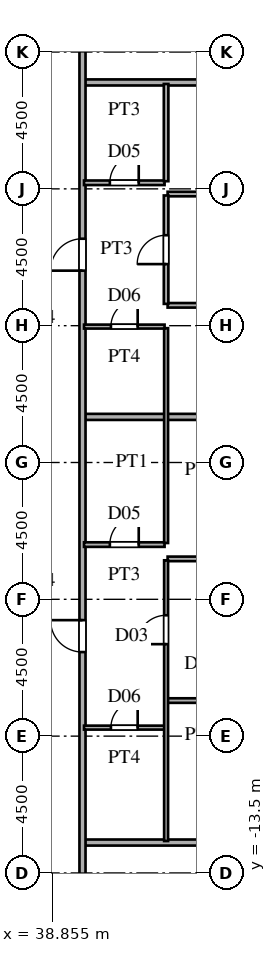
"""IFC4 building model, lengths in metres.
Left out: names, types, materials, properties, quantities, classifications, styles, units other than length and angle.
Written with IfcOpenShell. Run it as: python <this file> out.ifc"""

import sys

from ifc_helpers import new_model, si_unit, direction, frame, frame_2d, origin, place, context, subcontext, project, spatial, rectangle, extrude, source, transform, mapped, element, fill, save


model = new_model("IFC4")
c1 = context("Model", 3, precision=1e-05, world=origin(), true_north=direction((0.0, 1.0)))
c2 = subcontext(c1, "Body", "Model", "MODEL_VIEW")
j1 = project(units=[si_unit("LENGTHUNIT", "METRE"), si_unit("PLANEANGLEUNIT", "RADIAN")], contexts=[c1])
p1 = place(None, origin())
s1 = spatial("IfcSite", under=j1, at=p1, CompositionType="ELEMENT")
p2 = place(p1, origin())
s2 = spatial("IfcBuilding", under=s1, at=p2, CompositionType="ELEMENT")
p3 = place(p2, frame((0.0, 0.0, 44.1)))
s3 = spatial("IfcBuildingStorey", under=s2, at=p3, CompositionType="ELEMENT", Elevation=44.1)
p4 = place(p3, frame((39.93, -12.5, 0.0), z_axis=(0.0, 0.0, 1.0), x_axis=(1.0, 0.0, 0.0)))
e1 = element("IfcWall", 1, at=p4, inside=s3, PredefinedType="PARTITIONING", context=c2, shape_type="SweptSolid", body=[
    extrude(rectangle(XDim=26.407, YDim=0.2, at=frame_2d((13.204, 0.0))), origin(), (0.0, 0.0, 1.0), 3.38),
])
p5 = place(p3, frame((39.9, -8.72, 0.0), z_axis=(0.0, 0.0, 1.0), x_axis=(1.0, 0.0, 0.0)))
e2 = element("IfcWall", 2, at=p5, inside=s3, PredefinedType="PARTITIONING", context=c2, shape_type="SweptSolid", body=[
    extrude(rectangle(XDim=2.65, YDim=0.13, at=frame_2d((1.325, 0.0))), origin(), (0.0, 0.0, 1.0), 3.38),
])
p6 = place(p5, frame((0.885, 0.0, 0.0)))
e3 = element("IfcOpeningElement", 3, at=p6, cuts=e2, PredefinedType="OPENING", context=c2, shape_type="SweptSolid", body=[
    extrude(rectangle(XDim=0.88, YDim=2.1, at=frame_2d((0.44, 1.05))), frame((0.0, 0.075, 0.0), z_axis=(0.0, -1.0, 0.0), x_axis=(1.0, 0.0, 0.0)), (0.0, 0.0, 1.0), 0.15),
])
p7 = place(p3, frame((42.65, -7.83, 0.0), z_axis=(0.0, 0.0, 1.0), x_axis=(1.0, 0.0, 0.0)))
e4 = element("IfcWall", 4, at=p7, inside=s3, PredefinedType="PARTITIONING", context=c2, shape_type="SweptSolid", body=[
    extrude(rectangle(XDim=29.885, YDim=0.15, at=frame_2d((14.942, 0.0))), origin(), (0.0, 0.0, 1.0), 3.38),
])
p8 = place(p7, frame((5.425, 0.0, 0.0)))
e5 = element("IfcOpeningElement", 5, at=p8, cuts=e4, PredefinedType="OPENING", context=c2, shape_type="SweptSolid", body=[
    extrude(rectangle(XDim=0.95, YDim=2.15, at=frame_2d((0.475, 1.075))), frame((0.0, 0.085, 0.0), z_axis=(0.0, -1.0, 0.0), x_axis=(1.0, 0.0, 0.0)), (0.0, 0.0, 1.0), 0.17),
])
p9 = place(p7, frame((14.225, 0.0, 0.0)))
e6 = element("IfcOpeningElement", 6, at=p9, cuts=e4, PredefinedType="OPENING", context=c2, shape_type="SweptSolid", body=[
    extrude(rectangle(XDim=0.95, YDim=2.15, at=frame_2d((0.475, 1.075))), frame((0.0, 0.085, 0.0), z_axis=(0.0, -1.0, 0.0), x_axis=(1.0, 0.0, 0.0)), (0.0, 0.0, 1.0), 0.17),
])
p10 = place(p3, frame((42.65, -3.17, 0.0), z_axis=(0.0, 0.0, 1.0), x_axis=(1.0, 0.0, 0.0)))
e7 = element("IfcWall", 7, at=p10, inside=s3, PredefinedType="PARTITIONING", context=c2, shape_type="SweptSolid", body=[
    extrude(rectangle(XDim=29.885, YDim=0.15, at=frame_2d((14.942, 0.0))), origin(), (0.0, 0.0, 1.0), 3.38),
])
p11 = place(p10, frame((5.425, 0.0, 0.0)))
e8 = element("IfcOpeningElement", 8, at=p11, cuts=e7, PredefinedType="OPENING", context=c2, shape_type="SweptSolid", body=[
    extrude(rectangle(XDim=0.95, YDim=2.15, at=frame_2d((0.475, 1.075))), frame((0.0, 0.085, 0.0), z_axis=(0.0, -1.0, 0.0), x_axis=(1.0, 0.0, 0.0)), (0.0, 0.0, 1.0), 0.17),
])
p12 = place(p10, frame((14.225, 0.0, 0.0)))
e9 = element("IfcOpeningElement", 9, at=p12, cuts=e7, PredefinedType="OPENING", context=c2, shape_type="SweptSolid", body=[
    extrude(rectangle(XDim=0.95, YDim=2.15, at=frame_2d((0.475, 1.075))), frame((0.0, 0.085, 0.0), z_axis=(0.0, -1.0, 0.0), x_axis=(1.0, 0.0, 0.0)), (0.0, 0.0, 1.0), 0.17),
])
p13 = place(p3, frame((39.9, -2.7, 0.0), z_axis=(0.0, 0.0, 1.0), x_axis=(1.0, 0.0, 0.0)))
e10 = element("IfcWall", 10, at=p13, inside=s3, PredefinedType="PARTITIONING", context=c2, shape_type="SweptSolid", body=[
    extrude(rectangle(XDim=2.65, YDim=0.15, at=frame_2d((1.325, 0.0))), origin(), (0.0, 0.0, 1.0), 3.38),
])
p14 = place(p13, frame((0.85, 0.0, 0.0)))
e11 = element("IfcOpeningElement", 11, at=p14, cuts=e10, PredefinedType="OPENING", context=c2, shape_type="SweptSolid", body=[
    extrude(rectangle(XDim=0.95, YDim=2.15, at=frame_2d((0.475, 1.075))), frame((0.0, 0.085, 0.0), z_axis=(0.0, -1.0, 0.0), x_axis=(1.0, 0.0, 0.0)), (0.0, 0.0, 1.0), 0.17),
])
p15 = place(p3, frame((39.93, 1.5, 0.0), z_axis=(0.0, 0.0, 1.0), x_axis=(1.0, 0.0, 0.0)))
e12 = element("IfcWall", 12, at=p15, inside=s3, PredefinedType="PARTITIONING", context=c2, shape_type="SweptSolid", body=[
    extrude(rectangle(XDim=32.575, YDim=0.2, at=frame_2d((16.288, 0.0))), origin(), (0.0, 0.0, 1.0), 3.38),
])
p16 = place(p3, frame((39.9, 4.47, 0.0), z_axis=(0.0, 0.0, 1.0), x_axis=(1.0, 0.0, 0.0)))
e13 = element("IfcWall", 13, at=p16, inside=s3, PredefinedType="PARTITIONING", context=c2, shape_type="SweptSolid", body=[
    extrude(rectangle(XDim=2.65, YDim=0.13, at=frame_2d((1.325, 0.0))), origin(), (0.0, 0.0, 1.0), 2.68),
])
p17 = place(p16, frame((0.885, 0.0, 0.0)))
e14 = element("IfcOpeningElement", 14, at=p17, cuts=e13, PredefinedType="OPENING", context=c2, shape_type="SweptSolid", body=[
    extrude(rectangle(XDim=0.88, YDim=2.1, at=frame_2d((0.44, 1.05))), frame((0.0, 0.075, 0.0), z_axis=(0.0, -1.0, 0.0), x_axis=(1.0, 0.0, 0.0)), (0.0, 0.0, 1.0), 0.15),
])
p18 = place(p3, frame((42.65, 5.17, 0.0), z_axis=(0.0, 0.0, 1.0), x_axis=(1.0, 0.0, 0.0)))
e15 = element("IfcWall", 15, at=p18, inside=s3, PredefinedType="PARTITIONING", context=c2, shape_type="SweptSolid", body=[
    extrude(rectangle(XDim=29.885, YDim=0.15, at=frame_2d((14.942, 0.0))), origin(), (0.0, 0.0, 1.0), 3.38),
])
p19 = place(p18, frame((5.425, 0.0, 0.0)))
e16 = element("IfcOpeningElement", 16, at=p19, cuts=e15, PredefinedType="OPENING", context=c2, shape_type="SweptSolid", body=[
    extrude(rectangle(XDim=0.95, YDim=2.15, at=frame_2d((0.475, 1.075))), frame((0.0, 0.085, 0.0), z_axis=(0.0, -1.0, 0.0), x_axis=(1.0, 0.0, 0.0)), (0.0, 0.0, 1.0), 0.17),
])
p20 = place(p18, frame((14.225, 0.0, 0.0)))
e17 = element("IfcOpeningElement", 17, at=p20, cuts=e15, PredefinedType="OPENING", context=c2, shape_type="SweptSolid", body=[
    extrude(rectangle(XDim=0.95, YDim=2.15, at=frame_2d((0.475, 1.075))), frame((0.0, 0.085, 0.0), z_axis=(0.0, -1.0, 0.0), x_axis=(1.0, 0.0, 0.0)), (0.0, 0.0, 1.0), 0.17),
])
p21 = place(p3, frame((42.65, 8.83, 0.0), z_axis=(0.0, 0.0, 1.0), x_axis=(1.0, 0.0, 0.0)))
e18 = element("IfcWall", 18, at=p21, inside=s3, PredefinedType="PARTITIONING", context=c2, shape_type="SweptSolid", body=[
    extrude(rectangle(XDim=29.885, YDim=0.15, at=frame_2d((14.942, 0.0))), origin(), (0.0, 0.0, 1.0), 3.38),
])
p22 = place(p21, frame((5.425, 0.0, 0.0)))
e19 = element("IfcOpeningElement", 19, at=p22, cuts=e18, PredefinedType="OPENING", context=c2, shape_type="SweptSolid", body=[
    extrude(rectangle(XDim=0.95, YDim=2.15, at=frame_2d((0.475, 1.075))), frame((0.0, 0.085, 0.0), z_axis=(0.0, -1.0, 0.0), x_axis=(1.0, 0.0, 0.0)), (0.0, 0.0, 1.0), 0.17),
])
p23 = place(p21, frame((23.225, 0.0, 0.0)))
e20 = element("IfcOpeningElement", 20, at=p23, cuts=e18, PredefinedType="OPENING", context=c2, shape_type="SweptSolid", body=[
    extrude(rectangle(XDim=0.95, YDim=2.15, at=frame_2d((0.475, 1.075))), frame((0.0, 0.085, 0.0), z_axis=(0.0, -1.0, 0.0), x_axis=(1.0, 0.0, 0.0)), (0.0, 0.0, 1.0), 0.17),
])
p24 = place(p21, frame((14.225, 0.0, 0.0)))
e21 = element("IfcOpeningElement", 21, at=p24, cuts=e18, PredefinedType="OPENING", context=c2, shape_type="SweptSolid", body=[
    extrude(rectangle(XDim=0.95, YDim=2.15, at=frame_2d((0.475, 1.075))), frame((0.0, 0.085, 0.0), z_axis=(0.0, -1.0, 0.0), x_axis=(1.0, 0.0, 0.0)), (0.0, 0.0, 1.0), 0.17),
])
p25 = place(p3, frame((39.9, 9.2, 0.0), z_axis=(0.0, 0.0, 1.0), x_axis=(1.0, 0.0, 0.0)))
e22 = element("IfcWall", 22, at=p25, inside=s3, PredefinedType="PARTITIONING", context=c2, shape_type="SweptSolid", body=[
    extrude(rectangle(XDim=2.65, YDim=0.15, at=frame_2d((1.325, 0.0))), origin(), (0.0, 0.0, 1.0), 3.38),
])
p26 = place(p25, frame((0.85, 0.0, 0.0)))
e23 = element("IfcOpeningElement", 23, at=p26, cuts=e22, PredefinedType="OPENING", context=c2, shape_type="SweptSolid", body=[
    extrude(rectangle(XDim=0.95, YDim=2.15, at=frame_2d((0.475, 1.075))), frame((0.0, 0.085, 0.0), z_axis=(0.0, -1.0, 0.0), x_axis=(1.0, 0.0, 0.0)), (0.0, 0.0, 1.0), 0.17),
])
p27 = place(p3, frame((39.93, 12.5, 0.0), z_axis=(0.0, 0.0, 1.0), x_axis=(1.0, 0.0, 0.0)))
e24 = element("IfcWall", 24, at=p27, inside=s3, PredefinedType="PARTITIONING", context=c2, shape_type="SweptSolid", body=[
    extrude(rectangle(XDim=26.407, YDim=0.2, at=frame_2d((13.204, 0.0))), origin(), (0.0, 0.0, 1.0), 3.38),
])
p28 = place(p3, frame((39.85, -15.515, 0.0), z_axis=(0.0, 0.0, 1.0), x_axis=(0.0, 1.0, 0.0)))
e25 = element("IfcWall", 25, at=p28, inside=s3, PredefinedType="PARTITIONING", context=c2, shape_type="SweptSolid", body=[
    extrude(rectangle(XDim=31.03, YDim=0.2, at=frame_2d((15.515, 0.0))), origin(), (0.0, 0.0, 1.0), 3.38),
])
p29 = place(p28, frame((0.94, 0.0, 0.0)))
e26 = element("IfcOpeningElement", 26, at=p29, cuts=e25, PredefinedType="OPENING", context=c2, shape_type="SweptSolid", body=[
    extrude(rectangle(XDim=1.05, YDim=2.25, at=frame_2d((0.525, 1.125))), frame((0.0, 0.11, 0.0), z_axis=(0.0, -1.0, 0.0), x_axis=(1.0, 0.0, 0.0)), (0.0, 0.0, 1.0), 0.22),
])
p30 = place(p28, frame((9.28, 0.0, 0.0)))
e27 = element("IfcOpeningElement", 27, at=p30, cuts=e25, PredefinedType="OPENING", context=c2, shape_type="SweptSolid", body=[
    extrude(rectangle(XDim=1.05, YDim=2.25, at=frame_2d((0.525, 1.125))), frame((0.0, 0.11, 0.0), z_axis=(0.0, -1.0, 0.0), x_axis=(1.0, 0.0, 0.0)), (0.0, 0.0, 1.0), 0.22),
])
p31 = place(p28, frame((21.825, 0.0, 0.0)))
e28 = element("IfcOpeningElement", 28, at=p31, cuts=e25, PredefinedType="OPENING", context=c2, shape_type="SweptSolid", body=[
    extrude(rectangle(XDim=1.05, YDim=2.25, at=frame_2d((0.525, 1.125))), frame((0.0, 0.11, 0.0), z_axis=(0.0, -1.0, 0.0), x_axis=(1.0, 0.0, 0.0)), (0.0, 0.0, 1.0), 0.22),
])
p32 = place(p28, frame((29.04, 0.0, 0.0)))
e29 = element("IfcOpeningElement", 29, at=p32, cuts=e25, PredefinedType="OPENING", context=c2, shape_type="SweptSolid", body=[
    extrude(rectangle(XDim=1.05, YDim=2.25, at=frame_2d((0.525, 1.125))), frame((0.0, 0.11, 0.0), z_axis=(0.0, -1.0, 0.0), x_axis=(1.0, 0.0, 0.0)), (0.0, 0.0, 1.0), 0.22),
])
p33 = place(p3, frame((42.6, -12.45, 0.0), z_axis=(0.0, 0.0, 1.0), x_axis=(0.0, 1.0, 0.0)))
e30 = element("IfcWall", 30, at=p33, inside=s3, PredefinedType="PARTITIONING", context=c2, shape_type="SweptSolid", body=[
    extrude(rectangle(XDim=9.233, YDim=0.13, at=frame_2d((4.616, 0.0))), origin(), (0.0, 0.0, 1.0), 3.38),
])
p34 = place(p33, frame((6.475, 0.0, 0.0)))
e31 = element("IfcOpeningElement", 31, at=p34, cuts=e30, PredefinedType="OPENING", context=c2, shape_type="SweptSolid", body=[
    extrude(rectangle(XDim=0.95, YDim=2.15, at=frame_2d((0.475, 1.075))), frame((0.0, 0.075, 0.0), z_axis=(0.0, -1.0, 0.0), x_axis=(1.0, 0.0, 0.0)), (0.0, 0.0, 1.0), 0.15),
])
p35 = place(p3, frame((42.6, -2.648, 0.0), z_axis=(0.0, 0.0, 1.0), x_axis=(0.0, 1.0, 0.0)))
e32 = element("IfcWall", 32, at=p35, inside=s3, PredefinedType="PARTITIONING", context=c2, shape_type="SweptSolid", body=[
    extrude(rectangle(XDim=7.066, YDim=0.13, at=frame_2d((3.533, 0.0))), origin(), (0.0, 0.0, 1.0), 3.38),
])
p36 = place(p3, frame((42.6, 5.217, 0.0), z_axis=(0.0, 0.0, 1.0), x_axis=(0.0, 1.0, 0.0)))
e33 = element("IfcWall", 33, at=p36, inside=s3, PredefinedType="PARTITIONING", context=c2, shape_type="SweptSolid", body=[
    extrude(rectangle(XDim=3.566, YDim=0.15, at=frame_2d((1.783, 0.0))), origin(), (0.0, 0.0, 1.0), 3.38),
])
p37 = place(p36, frame((1.308, 0.0, 0.0)))
e34 = element("IfcOpeningElement", 34, at=p37, cuts=e33, PredefinedType="OPENING", context=c2, shape_type="SweptSolid", body=[
    extrude(rectangle(XDim=0.95, YDim=2.15, at=frame_2d((0.475, 1.075))), frame((0.0, 0.085, 0.0), z_axis=(0.0, -1.0, 0.0), x_axis=(1.0, 0.0, 0.0)), (0.0, 0.0, 1.0), 0.17),
])
p38 = place(p3, frame((42.6, 9.252, 0.0), z_axis=(0.0, 0.0, 1.0), x_axis=(0.0, 1.0, 0.0)))
e35 = element("IfcWall", 35, at=p38, inside=s3, PredefinedType="PARTITIONING", context=c2, shape_type="SweptSolid", body=[
    extrude(rectangle(XDim=3.198, YDim=0.15, at=frame_2d((1.599, 0.0))), origin(), (0.0, 0.0, 1.0), 3.38),
])
m1 = source(origin(), c2, "Body", "SweptSolid", [
    extrude(rectangle(XDim=0.88, YDim=2.1, at=frame_2d((0.44, 1.05))), frame((0.0, 0.025, 0.0), z_axis=(0.0, -1.0, 0.0), x_axis=(1.0, 0.0, 0.0)), (0.0, 0.0, 1.0), 0.05),
])
p39 = place(p6, origin())
e36 = element("IfcDoor", 36, at=p39, inside=s3, OperationType="SINGLE_SWING_RIGHT", PredefinedType="DOOR", context=c2, shape_type="MappedRepresentation", body=[
    mapped(m1, transform((0.0, 0.0, 0.0), scale=1.0)),
])
fill(e3, e36)
m2 = source(origin(), c2, "Body", "SweptSolid", [
    extrude(rectangle(XDim=0.95, YDim=2.15, at=frame_2d((0.475, 1.075))), frame((0.0, 0.025, 0.0), z_axis=(0.0, -1.0, 0.0), x_axis=(1.0, 0.0, 0.0)), (0.0, 0.0, 1.0), 0.05),
])
p40 = place(p14, origin())
e37 = element("IfcDoor", 37, at=p40, inside=s3, OperationType="SINGLE_SWING_RIGHT", PredefinedType="DOOR", context=c2, shape_type="MappedRepresentation", body=[
    mapped(m2, transform((0.0, 0.0, 0.0), scale=1.0)),
])
fill(e11, e37)
p41 = place(p17, origin())
e38 = element("IfcDoor", 38, at=p41, inside=s3, OperationType="SINGLE_SWING_RIGHT", PredefinedType="DOOR", context=c2, shape_type="MappedRepresentation", body=[
    mapped(m1, transform((0.0, 0.0, 0.0), scale=1.0)),
])
fill(e14, e38)
p42 = place(p26, origin())
e39 = element("IfcDoor", 39, at=p42, inside=s3, OperationType="SINGLE_SWING_RIGHT", PredefinedType="DOOR", context=c2, shape_type="MappedRepresentation", body=[
    mapped(m2, transform((0.0, 0.0, 0.0), scale=1.0)),
])
fill(e23, e39)
m3 = source(origin(), c2, "Body", "SweptSolid", [
    extrude(rectangle(XDim=1.05, YDim=2.25, at=frame_2d((0.525, 1.125))), frame((0.0, 0.025, 0.0), z_axis=(0.0, -1.0, 0.0), x_axis=(1.0, 0.0, 0.0)), (0.0, 0.0, 1.0), 0.05),
])
p43 = place(p30, origin())
e40 = element("IfcDoor", 40, at=p43, inside=s3, OperationType="SINGLE_SWING_RIGHT", PredefinedType="DOOR", context=c2, shape_type="MappedRepresentation", body=[
    mapped(m3, transform((0.0, 0.0, 0.0), scale=1.0)),
])
fill(e27, e40)
p44 = place(p31, origin())
e41 = element("IfcDoor", 41, at=p44, inside=s3, OperationType="SINGLE_SWING_LEFT", PredefinedType="DOOR", context=c2, shape_type="MappedRepresentation", body=[
    mapped(m3, transform((0.0, 0.0, 0.0), scale=1.0)),
])
fill(e28, e41)
p45 = place(p34, origin())
e42 = element("IfcDoor", 42, at=p45, inside=s3, OperationType="SINGLE_SWING_LEFT", PredefinedType="DOOR", context=c2, shape_type="MappedRepresentation", body=[
    mapped(m2, transform((0.0, 0.0, 0.0), scale=1.0)),
])
fill(e31, e42)
p46 = place(p37, origin())
e43 = element("IfcDoor", 43, at=p46, inside=s3, OperationType="SINGLE_SWING_LEFT", PredefinedType="DOOR", context=c2, shape_type="MappedRepresentation", body=[
    mapped(m2, transform((0.0, 0.0, 0.0), scale=1.0)),
])
fill(e34, e43)
save(model, sys.argv[1])
